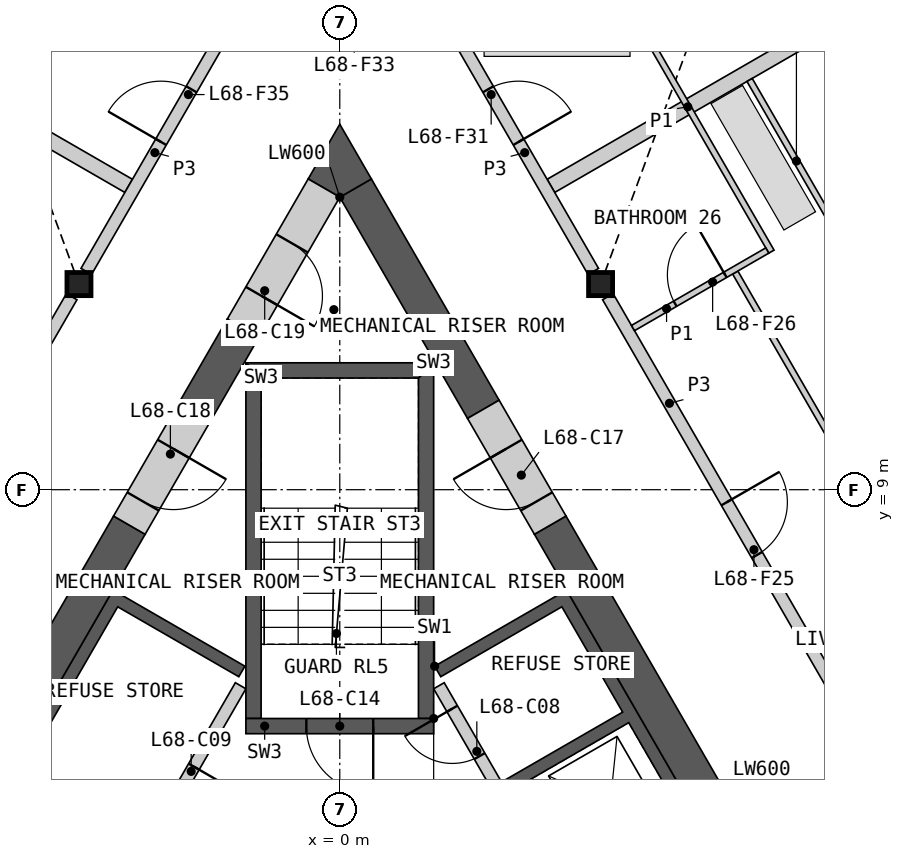
"""IFC4 building model, lengths in metres.
Left out: names, types, materials, properties, quantities, classifications, styles, units other than length and angle.
Written with IfcOpenShell. Run it as: python <this file> out.ifc"""

import sys

from ifc_helpers import new_model, si_unit, direction, frame, frame_2d, origin, origin_2d, place, context, subcontext, project, spatial, polyline, rectangle, i_section, outline, extrude, element, fill, save


model = new_model("IFC4")
c1 = context("Model", 3, precision=1e-05, world=origin(), true_north=direction((0.0, 1.0)))
c2 = subcontext(c1, "Body", "Model", "MODEL_VIEW")
j1 = project(units=[si_unit("LENGTHUNIT", "METRE"), si_unit("PLANEANGLEUNIT", "RADIAN")], contexts=[c1])
p1 = place(None, origin())
s1 = spatial("IfcSite", under=j1, at=p1, CompositionType="ELEMENT")
p2 = place(p1, origin())
s2 = spatial("IfcBuilding", under=s1, at=p2, CompositionType="ELEMENT")
p3 = place(p2, frame((0.0, 0.0, 312.0)))
s3 = spatial("IfcBuildingStorey", under=s2, at=p3, CompositionType="ELEMENT", Elevation=312.0)
for number, where, z_axis, x_axis in (
    (1, (-4.289, 12.382, 0.0), (0.0, 0.0, 1.0), (1.0, 0.0, 0.0)),
    (2, (4.289, 12.382, 0.0), (0.0, 0.0, 1.0), (1.0, 0.0, 0.0)),
):
    element("IfcColumn", number, at=place(p3, frame(where, z_axis=z_axis, x_axis=x_axis)), inside=s3, PredefinedType="COLUMN", context=c2, shape_type="SweptSolid", body=[
        extrude(i_section(OverallWidth=0.396, OverallDepth=0.381, WebThickness=0.019, FlangeThickness=0.03, at=origin_2d()), origin(), (0.0, 0.0, 1.0), 3.4),
    ])
p4 = place(p3, origin())
e3 = element("IfcWall", 3, at=p4, inside=s3, PredefinedType="SHEAR", context=c2, shape_type="SweptSolid", body=[
    extrude(outline(polyline([(1.561, 6.097), (3.731, 7.35), (8.231, -0.444), (6.061, -1.697), (5.96, -1.524), (7.952, -0.374), (6.952, 1.358), (4.96, 0.208), (4.861, 0.381), (6.852, 1.531), (5.852, 3.263), (3.861, 2.113), (3.76, 2.287), (5.752, 3.437), (4.752, 5.169), (2.76, 4.019), (2.66, 4.192), (4.652, 5.342), (3.652, 7.074), (1.66, 5.924), (1.561, 6.097)])), origin(), (0.0, 0.0, 1.0), 3.1),
])
p5 = place(p3, frame((5.817, -1.476, 0.0), z_axis=(0.0, 0.0, 1.0), x_axis=(-0.500002616675, 0.866023893041, 0.0)))
e4 = element("IfcWall", 4, at=p5, inside=s3, PredefinedType="SOLIDWALL", context=c2, shape_type="SweptSolid", body=[
    extrude(rectangle(XDim=8.373, YDim=0.2, at=frame_2d((4.187, 0.0))), origin(), (0.0, 0.0, 1.0), 3.1),
])
p6 = place(p5, frame((0.337, 0.0, 0.0)))
e5 = element("IfcOpeningElement", 5, at=p6, cuts=e4, PredefinedType="OPENING", context=c2, shape_type="SweptSolid", body=[
    extrude(rectangle(XDim=1.1, YDim=2.1, at=frame_2d((0.55, 1.05))), frame((0.0, 0.11, 0.0), z_axis=(0.0, -1.0, 0.0), x_axis=(1.0, 0.0, 0.0)), (0.0, 0.0, 1.0), 0.22),
])
p7 = place(p5, frame((2.537, 0.0, 0.0)))
e6 = element("IfcOpeningElement", 6, at=p7, cuts=e4, PredefinedType="OPENING", context=c2, shape_type="SweptSolid", body=[
    extrude(rectangle(XDim=1.1, YDim=2.1, at=frame_2d((0.55, 1.05))), frame((0.0, 0.11, 0.0), z_axis=(0.0, -1.0, 0.0), x_axis=(1.0, 0.0, 0.0)), (0.0, 0.0, 1.0), 0.22),
])
p8 = place(p5, frame((4.737, 0.0, 0.0)))
e7 = element("IfcOpeningElement", 7, at=p8, cuts=e4, PredefinedType="OPENING", context=c2, shape_type="SweptSolid", body=[
    extrude(rectangle(XDim=1.1, YDim=2.1, at=frame_2d((0.55, 1.05))), frame((0.0, 0.11, 0.0), z_axis=(0.0, -1.0, 0.0), x_axis=(1.0, 0.0, 0.0)), (0.0, 0.0, 1.0), 0.22),
])
p9 = place(p5, frame((7.037, 0.0, 0.0)))
e8 = element("IfcOpeningElement", 8, at=p9, cuts=e4, PredefinedType="OPENING", context=c2, shape_type="SweptSolid", body=[
    extrude(rectangle(XDim=0.9, YDim=2.1, at=frame_2d((0.45, 1.05))), frame((0.0, 0.11, 0.0), z_axis=(0.0, -1.0, 0.0), x_axis=(1.0, 0.0, 0.0)), (0.0, 0.0, 1.0), 0.22),
])
p10 = place(p3, origin())
e9 = element("IfcWall", 9, at=p10, inside=s3, PredefinedType="SHEAR", context=c2, shape_type="SweptSolid", body=[
    extrude(outline(polyline([(-4.96, 0.208), (-7.131, 1.461), (-3.731, 7.35), (-1.561, 6.097), (-1.66, 5.924), (-3.652, 7.074), (-5.752, 3.437), (-3.76, 2.287), (-3.861, 2.113), (-5.852, 3.263), (-6.852, 1.531), (-4.861, 0.381), (-4.96, 0.208)])), origin(), (0.0, 0.0, 1.0), 3.1),
])
p11 = place(p3, frame((-1.631, 5.776, 0.0), z_axis=(0.0, 0.0, 1.0), x_axis=(-0.499992876559, -0.866029516466, 0.0)))
e10 = element("IfcWall", 10, at=p11, inside=s3, PredefinedType="SOLIDWALL", context=c2, shape_type="SweptSolid", body=[
    extrude(rectangle(XDim=6.486, YDim=0.2, at=frame_2d((3.243, 0.0))), origin(), (0.0, 0.0, 1.0), 3.1),
])
p12 = place(p11, frame((1.537, 0.0, 0.0)))
e11 = element("IfcOpeningElement", 11, at=p12, cuts=e10, PredefinedType="OPENING", context=c2, shape_type="SweptSolid", body=[
    extrude(rectangle(XDim=0.9, YDim=2.1, at=frame_2d((0.45, 1.05))), frame((0.0, 0.11, 0.0), z_axis=(0.0, -1.0, 0.0), x_axis=(1.0, 0.0, 0.0)), (0.0, 0.0, 1.0), 0.22),
])
p13 = place(p11, frame((4.837, 0.0, 0.0)))
e12 = element("IfcOpeningElement", 12, at=p13, cuts=e10, PredefinedType="OPENING", context=c2, shape_type="SweptSolid", body=[
    extrude(rectangle(XDim=0.9, YDim=2.1, at=frame_2d((0.45, 1.05))), frame((0.0, 0.11, 0.0), z_axis=(0.0, -1.0, 0.0), x_axis=(1.0, 0.0, 0.0)), (0.0, 0.0, 1.0), 0.22),
])
p14 = place(p3, origin())
e13 = element("IfcWall", 13, at=p14, inside=s3, PredefinedType="SHEAR", context=c2, shape_type="SweptSolid", body=[
    extrude(outline(polyline([(1.544, 5.237), (1.544, 11.087), (1.294, 10.837), (1.294, 5.237), (1.544, 5.237)])), origin(), (0.0, 0.0, 1.0), 3.1),
])
p15 = place(p3, origin())
e14 = element("IfcWall", 14, at=p15, inside=s3, PredefinedType="SHEAR", context=c2, shape_type="SweptSolid", body=[
    extrude(outline(polyline([(1.544, 11.087), (-1.544, 11.087), (-1.294, 10.837), (1.294, 10.837), (1.544, 11.087)])), origin(), (0.0, 0.0, 1.0), 3.1),
])
p16 = place(p3, origin())
e15 = element("IfcWall", 15, at=p16, inside=s3, PredefinedType="SHEAR", context=c2, shape_type="SweptSolid", body=[
    extrude(outline(polyline([(-1.294, 10.837), (-1.544, 11.087), (-1.544, 5.237), (-1.294, 5.237), (-1.294, 10.837)])), origin(), (0.0, 0.0, 1.0), 3.1),
])
p17 = place(p3, frame((1.544, 5.112, 0.0), z_axis=(0.0, 0.0, 1.0), x_axis=(-1.0, 0.0, 0.0)))
e16 = element("IfcWall", 16, at=p17, inside=s3, PredefinedType="SHEAR", context=c2, shape_type="SweptSolid", body=[
    extrude(rectangle(XDim=3.088, YDim=0.25, at=frame_2d((1.544, 0.0))), origin(), (0.0, 0.0, 1.0), 3.1),
])
p18 = place(p17, frame((0.994, 0.0, 0.0)))
e17 = element("IfcOpeningElement", 17, at=p18, cuts=e16, PredefinedType="OPENING", context=c2, shape_type="SweptSolid", body=[
    extrude(rectangle(XDim=1.1, YDim=2.1, at=frame_2d((0.55, 1.05))), frame((0.0, 0.135, 0.0), z_axis=(0.0, -1.0, 0.0), x_axis=(1.0, 0.0, 0.0)), (0.0, 0.0, 1.0), 0.27),
])
p19 = place(p3, frame((8.686, -0.634, 0.0), z_axis=(0.0, 0.0, 1.0), x_axis=(-0.50001836461, 0.866014800712, 0.0)))
e18 = element("IfcWall", 18, at=p19, inside=s3, PredefinedType="SHEAR", context=c2, shape_type="SweptSolid", body=[
    extrude(rectangle(XDim=10.451, YDim=0.6, at=frame_2d((5.225, 0.0))), origin(), (0.0, 0.0, 1.0), 3.1),
])
p20 = place(p3, frame((2.361, 10.322, 0.0), z_axis=(0.0, 0.0, 1.0), x_axis=(-0.500000735859, 0.866024978935, 0.0)))
e19 = element("IfcWall", 19, at=p20, inside=s3, PredefinedType="SHEAR", context=c2, shape_type="SweptSolid", body=[
    extrude(rectangle(XDim=4.202, YDim=0.6, at=frame_2d((2.101, 0.0))), origin(), (0.0, 0.0, 1.0), 3.1),
])
p21 = place(p3, frame((-3.461, 8.417, 0.0), z_axis=(0.0, 0.0, 1.0), x_axis=(-0.50000391502, -0.866023143435, 0.0)))
e20 = element("IfcWall", 20, at=p21, inside=s3, PredefinedType="SHEAR", context=c2, shape_type="SweptSolid", body=[
    extrude(rectangle(XDim=7.759, YDim=0.6, at=frame_2d((3.879, 0.0))), origin(), (0.0, 0.0, 1.0), 3.1),
])
p22 = place(p3, frame((-1.59, 11.658, 0.0), z_axis=(0.0, 0.0, 1.0), x_axis=(-0.500037594623, -0.866003697431, 0.0)))
e21 = element("IfcWall", 21, at=p22, inside=s3, PredefinedType="SHEAR", context=c2, shape_type="SweptSolid", body=[
    extrude(rectangle(XDim=1.542, YDim=0.6, at=frame_2d((0.771, 0.0))), origin(), (0.0, 0.0, 1.0), 3.1),
])
p23 = place(p3, origin())
e22 = element("IfcWall", 22, at=p23, inside=s3, PredefinedType="SHEAR", context=c2, shape_type="SweptSolid", body=[
    extrude(outline(polyline([(0.0, 13.811), (-0.52, 14.111), (0.0, 15.011), (0.52, 14.111), (0.0, 13.811)])), origin(), (0.0, 0.0, 1.0), 3.1),
])
p24 = place(p3, frame((3.461, 8.417, 0.0), z_axis=(0.0, 0.0, 1.0), x_axis=(-0.499946605688, 0.86605622881, 0.0)))
e23 = element("IfcWall", 23, at=p24, inside=s3, PredefinedType="SHEAR", context=c2, shape_type="SweptSolid", body=[
    extrude(rectangle(XDim=2.2, YDim=0.6, at=frame_2d((1.1, 0.0))), origin(), (0.0, 0.0, 1.0), 3.1),
])
p25 = place(p24, frame((0.45, 0.0, 0.0)))
e24 = element("IfcOpeningElement", 24, at=p25, cuts=e23, PredefinedType="OPENING", context=c2, shape_type="SweptSolid", body=[
    extrude(rectangle(XDim=1.0, YDim=2.1, at=frame_2d((0.5, 1.05))), frame((0.0, 0.31, 0.0), z_axis=(0.0, -1.0, 0.0), x_axis=(1.0, 0.0, 0.0)), (0.0, 0.0, 1.0), 0.62),
])
p26 = place(p3, frame((-2.361, 10.322, 0.0), z_axis=(0.0, 0.0, 1.0), x_axis=(-0.499946605688, -0.86605622881, 0.0)))
e25 = element("IfcWall", 25, at=p26, inside=s3, PredefinedType="SHEAR", context=c2, shape_type="SweptSolid", body=[
    extrude(rectangle(XDim=2.2, YDim=0.6, at=frame_2d((1.1, 0.0))), origin(), (0.0, 0.0, 1.0), 3.1),
])
p27 = place(p26, frame((0.75, 0.0, 0.0)))
e26 = element("IfcOpeningElement", 26, at=p27, cuts=e25, PredefinedType="OPENING", context=c2, shape_type="SweptSolid", body=[
    extrude(rectangle(XDim=1.0, YDim=2.1, at=frame_2d((0.5, 1.05))), frame((0.0, 0.31, 0.0), z_axis=(0.0, -1.0, 0.0), x_axis=(1.0, 0.0, 0.0)), (0.0, 0.0, 1.0), 0.62),
])
p28 = place(p3, frame((-0.26, 13.961, 0.0), z_axis=(0.0, 0.0, 1.0), x_axis=(-0.49997936161, -0.866037319036, 0.0)))
e27 = element("IfcWall", 27, at=p28, inside=s3, PredefinedType="SHEAR", context=c2, shape_type="SweptSolid", body=[
    extrude(rectangle(XDim=2.66, YDim=0.6, at=frame_2d((1.33, 0.0))), origin(), (0.0, 0.0, 1.0), 3.1),
])
p29 = place(p28, frame((1.05, 0.0, 0.0)))
e28 = element("IfcOpeningElement", 28, at=p29, cuts=e27, PredefinedType="OPENING", context=c2, shape_type="SweptSolid", body=[
    extrude(rectangle(XDim=1.0, YDim=2.1, at=frame_2d((0.5, 1.05))), frame((0.0, 0.31, 0.0), z_axis=(0.0, -1.0, 0.0), x_axis=(1.0, 0.0, 0.0)), (0.0, 0.0, 1.0), 0.62),
])
p30 = place(p3, frame((3.472, 13.997, 0.0), z_axis=(0.0, 0.0, 1.0), x_axis=(0.866029233976, 0.499993365855, 0.0)))
e29 = element("IfcWall", 29, at=p30, inside=s3, PredefinedType="PARTITIONING", context=c2, shape_type="SweptSolid", body=[
    extrude(rectangle(XDim=12.637, YDim=0.25, at=frame_2d((6.319, 0.0))), origin(), (0.0, 0.0, 1.0), 2.33),
])
p31 = place(p3, frame((-8.458, 5.16, 0.0), z_axis=(0.0, 0.0, 1.0), x_axis=(0.499984266882, 0.866034487114, 0.0)))
e30 = element("IfcWall", 30, at=p31, inside=s3, PredefinedType="PARTITIONING", context=c2, shape_type="SweptSolid", body=[
    extrude(rectangle(XDim=8.099, YDim=0.2, at=frame_2d((4.049, 0.0))), origin(), (0.0, 0.0, 1.0), 3.1),
])
p32 = place(p31, frame((3.093, 0.0, 0.0)))
e31 = element("IfcOpeningElement", 31, at=p32, cuts=e30, PredefinedType="OPENING", context=c2, shape_type="SweptSolid", body=[
    extrude(rectangle(XDim=1.0, YDim=2.1, at=frame_2d((0.5, 1.05))), frame((0.0, 0.11, 0.0), z_axis=(0.0, -1.0, 0.0), x_axis=(1.0, 0.0, 0.0)), (0.0, 0.0, 1.0), 0.22),
])
p33 = place(p3, frame((4.409, 12.174, 0.0), z_axis=(0.0, 0.0, 1.0), x_axis=(0.499984266882, -0.866034487114, 0.0)))
e32 = element("IfcWall", 32, at=p33, inside=s3, PredefinedType="PARTITIONING", context=c2, shape_type="SweptSolid", body=[
    extrude(rectangle(XDim=8.099, YDim=0.2, at=frame_2d((4.049, 0.0))), origin(), (0.0, 0.0, 1.0), 3.1),
])
p34 = place(p33, frame((3.905, 0.0, 0.0)))
e33 = element("IfcOpeningElement", 33, at=p34, cuts=e32, PredefinedType="OPENING", context=c2, shape_type="SweptSolid", body=[
    extrude(rectangle(XDim=1.0, YDim=2.1, at=frame_2d((0.5, 1.05))), frame((0.0, 0.11, 0.0), z_axis=(0.0, -1.0, 0.0), x_axis=(1.0, 0.0, 0.0)), (0.0, 0.0, 1.0), 0.22),
])
p35 = place(p3, frame((-8.257, 16.76, 0.0), z_axis=(0.0, 0.0, 1.0), x_axis=(0.866034739526, -0.499983829672, 0.0)))
e34 = element("IfcWall", 34, at=p35, inside=s3, PredefinedType="PARTITIONING", context=c2, shape_type="SweptSolid", body=[
    extrude(rectangle(XDim=5.525, YDim=0.25, at=frame_2d((2.763, 0.0))), origin(), (0.0, 0.0, 1.0), 2.33),
])
p36 = place(p3, frame((1.913, 16.498, 0.0), z_axis=(0.0, 0.0, 1.0), x_axis=(0.499950370306, -0.866054055606, 0.0)))
e35 = element("IfcWall", 35, at=p36, inside=s3, PredefinedType="PARTITIONING", context=c2, shape_type="SweptSolid", body=[
    extrude(rectangle(XDim=4.513, YDim=0.2, at=frame_2d((2.256, 0.0))), origin(), (0.0, 0.0, 1.0), 3.1),
])
p37 = place(p36, frame((1.053, 0.0, 0.0)))
e36 = element("IfcOpeningElement", 36, at=p37, cuts=e35, PredefinedType="OPENING", context=c2, shape_type="SweptSolid", body=[
    extrude(rectangle(XDim=1.0, YDim=2.1, at=frame_2d((0.5, 1.05))), frame((0.0, 0.11, 0.0), z_axis=(0.0, -1.0, 0.0), x_axis=(1.0, 0.0, 0.0)), (0.0, 0.0, 1.0), 0.22),
])
p38 = place(p3, frame((-4.169, 12.59, 0.0), z_axis=(0.0, 0.0, 1.0), x_axis=(0.499950370306, 0.866054055606, 0.0)))
e37 = element("IfcWall", 37, at=p38, inside=s3, PredefinedType="PARTITIONING", context=c2, shape_type="SweptSolid", body=[
    extrude(rectangle(XDim=4.513, YDim=0.2, at=frame_2d((2.256, 0.0))), origin(), (0.0, 0.0, 1.0), 3.1),
])
p39 = place(p38, frame((2.459, 0.0, 0.0)))
e38 = element("IfcOpeningElement", 38, at=p39, cuts=e37, PredefinedType="OPENING", context=c2, shape_type="SweptSolid", body=[
    extrude(rectangle(XDim=1.0, YDim=2.1, at=frame_2d((0.5, 1.05))), frame((0.0, 0.11, 0.0), z_axis=(0.0, -1.0, 0.0), x_axis=(1.0, 0.0, 0.0)), (0.0, 0.0, 1.0), 0.22),
])
p40 = place(p3, frame((6.74, 15.739, 0.0), z_axis=(0.0, 0.0, 1.0), x_axis=(0.499995022685, -0.86602827742, 0.0)))
e39 = element("IfcWall", 39, at=p40, inside=s3, PredefinedType="PARTITIONING", context=c2, shape_type="SweptSolid", body=[
    extrude(rectangle(XDim=15.404, YDim=0.1, at=frame_2d((7.702, 0.0))), origin(), (0.0, 0.0, 1.0), 2.33),
])
p41 = place(p40, frame((8.582, 0.0, 0.0)))
e40 = element("IfcOpeningElement", 40, at=p41, cuts=e39, PredefinedType="OPENING", context=c2, shape_type="SweptSolid", body=[
    extrude(rectangle(XDim=0.95, YDim=2.1, at=frame_2d((0.475, 1.05))), frame((0.0, 0.06, 0.0), z_axis=(0.0, -1.0, 0.0), x_axis=(1.0, 0.0, 0.0)), (0.0, 0.0, 1.0), 0.12),
])
p42 = place(p3, frame((6.504, 12.572, 0.0), z_axis=(0.0, 0.0, 1.0), x_axis=(0.499998094172, -0.866026504112, 0.0)))
e41 = element("IfcWall", 41, at=p42, inside=s3, PredefinedType="PARTITIONING", context=c2, shape_type="SweptSolid", body=[
    extrude(rectangle(XDim=12.778, YDim=0.1, at=frame_2d((6.389, 0.0))), origin(), (0.0, 0.0, 1.0), 2.33),
])
p43 = place(p42, frame((3.759, 0.0, 0.0)))
e42 = element("IfcOpeningElement", 42, at=p43, cuts=e41, PredefinedType="OPENING", context=c2, shape_type="SweptSolid", body=[
    extrude(rectangle(XDim=0.95, YDim=2.1, at=frame_2d((0.475, 1.05))), frame((0.0, 0.06, 0.0), z_axis=(0.0, -1.0, 0.0), x_axis=(1.0, 0.0, 0.0)), (0.0, 0.0, 1.0), 0.12),
])
p44 = place(p3, frame((4.349, 17.679, 0.0), z_axis=(0.0, 0.0, 1.0), x_axis=(0.49997732567, -0.866038494419, 0.0)))
e43 = element("IfcWall", 43, at=p44, inside=s3, PredefinedType="PARTITIONING", context=c2, shape_type="SweptSolid", body=[
    extrude(rectangle(XDim=5.5, YDim=0.1, at=frame_2d((2.75, 0.0))), origin(), (0.0, 0.0, 1.0), 2.33),
])
p45 = place(p3, frame((-7.099, 12.915, 0.0), z_axis=(0.0, 0.0, 1.0), x_axis=(0.49997732567, 0.866038494419, 0.0)))
e44 = element("IfcWall", 44, at=p45, inside=s3, PredefinedType="PARTITIONING", context=c2, shape_type="SweptSolid", body=[
    extrude(rectangle(XDim=5.5, YDim=0.1, at=frame_2d((2.75, 0.0))), origin(), (0.0, 0.0, 1.0), 2.33),
])
p46 = place(p45, frame((0.756, 0.0, 0.0)))
e45 = element("IfcOpeningElement", 45, at=p46, cuts=e44, PredefinedType="OPENING", context=c2, shape_type="SweptSolid", body=[
    extrude(rectangle(XDim=0.95, YDim=2.1, at=frame_2d((0.475, 1.05))), frame((0.0, 0.06, 0.0), z_axis=(0.0, -1.0, 0.0), x_axis=(1.0, 0.0, 0.0)), (0.0, 0.0, 1.0), 0.12),
])
p47 = place(p3, frame((4.822, 11.659, 0.0), z_axis=(0.0, 0.0, 1.0), x_axis=(0.866030925526, 0.499990435942, 0.0)))
e46 = element("IfcWall", 46, at=p47, inside=s3, PredefinedType="PARTITIONING", context=c2, shape_type="SweptSolid", body=[
    extrude(rectangle(XDim=2.55, YDim=0.1, at=frame_2d((1.275, 0.0))), origin(), (0.0, 0.0, 1.0), 2.33),
])
p48 = place(p47, frame((0.8, 0.0, 0.0)))
e47 = element("IfcOpeningElement", 47, at=p48, cuts=e46, PredefinedType="OPENING", context=c2, shape_type="SweptSolid", body=[
    extrude(rectangle(XDim=0.95, YDim=2.1, at=frame_2d((0.475, 1.05))), frame((0.0, 0.06, 0.0), z_axis=(0.0, -1.0, 0.0), x_axis=(1.0, 0.0, 0.0)), (0.0, 0.0, 1.0), 0.12),
])
p49 = place(p9, origin())
e48 = element("IfcDoor", 48, at=p49, inside=s3, OperationType="SINGLE_SWING_RIGHT", PredefinedType="DOOR", context=c2, shape_type="SweptSolid", body=[
    extrude(rectangle(XDim=0.9, YDim=2.1, at=frame_2d((0.45, 1.05))), frame((0.0, 0.025, 0.0), z_axis=(0.0, -1.0, 0.0), x_axis=(1.0, 0.0, 0.0)), (0.0, 0.0, 1.0), 0.05),
])
fill(e8, e48)
p50 = place(p12, origin())
e49 = element("IfcDoor", 49, at=p50, inside=s3, OperationType="SINGLE_SWING_LEFT", PredefinedType="DOOR", context=c2, shape_type="SweptSolid", body=[
    extrude(rectangle(XDim=0.9, YDim=2.1, at=frame_2d((0.45, 1.05))), frame((0.0, 0.025, 0.0), z_axis=(0.0, -1.0, 0.0), x_axis=(1.0, 0.0, 0.0)), (0.0, 0.0, 1.0), 0.05),
])
fill(e11, e49)
p51 = place(p18, origin())
e50 = element("IfcDoor", 50, at=p51, inside=s3, OperationType="SINGLE_SWING_LEFT", PredefinedType="DOOR", context=c2, shape_type="SweptSolid", body=[
    extrude(rectangle(XDim=1.1, YDim=2.1, at=frame_2d((0.55, 1.05))), frame((0.0, 0.025, 0.0), z_axis=(0.0, -1.0, 0.0), x_axis=(1.0, 0.0, 0.0)), (0.0, 0.0, 1.0), 0.05),
])
fill(e17, e50)
p52 = place(p25, origin())
e51 = element("IfcDoor", 51, at=p52, inside=s3, OperationType="SINGLE_SWING_RIGHT", PredefinedType="DOOR", context=c2, shape_type="SweptSolid", body=[
    extrude(rectangle(XDim=1.0, YDim=2.1, at=frame_2d((0.5, 1.05))), frame((0.0, 0.055, 0.0), z_axis=(0.0, -1.0, 0.0), x_axis=(1.0, 0.0, 0.0)), (0.0, 0.0, 1.0), 0.05),
])
fill(e24, e51)
p53 = place(p27, origin())
e52 = element("IfcDoor", 52, at=p53, inside=s3, OperationType="SINGLE_SWING_LEFT", PredefinedType="DOOR", context=c2, shape_type="SweptSolid", body=[
    extrude(rectangle(XDim=1.0, YDim=2.1, at=frame_2d((0.5, 1.05))), frame((0.0, 0.055, 0.0), z_axis=(0.0, -1.0, 0.0), x_axis=(1.0, 0.0, 0.0)), (0.0, 0.0, 1.0), 0.05),
])
fill(e26, e52)
p54 = place(p29, origin())
e53 = element("IfcDoor", 53, at=p54, inside=s3, OperationType="SINGLE_SWING_RIGHT", PredefinedType="DOOR", context=c2, shape_type="SweptSolid", body=[
    extrude(rectangle(XDim=1.0, YDim=2.1, at=frame_2d((0.5, 1.05))), frame((0.0, 0.055, 0.0), z_axis=(0.0, -1.0, 0.0), x_axis=(1.0, 0.0, 0.0)), (0.0, 0.0, 1.0), 0.05),
])
fill(e28, e53)
p55 = place(p34, origin())
e54 = element("IfcDoor", 54, at=p55, inside=s3, OperationType="SINGLE_SWING_LEFT", PredefinedType="DOOR", context=c2, shape_type="SweptSolid", body=[
    extrude(rectangle(XDim=1.0, YDim=2.1, at=frame_2d((0.5, 1.05))), frame((0.0, 0.025, 0.0), z_axis=(0.0, -1.0, 0.0), x_axis=(1.0, 0.0, 0.0)), (0.0, 0.0, 1.0), 0.05),
])
fill(e33, e54)
p56 = place(p48, origin())
e55 = element("IfcDoor", 55, at=p56, inside=s3, OperationType="SINGLE_SWING_RIGHT", PredefinedType="DOOR", context=c2, shape_type="SweptSolid", body=[
    extrude(rectangle(XDim=0.95, YDim=2.1, at=frame_2d((0.475, 1.05))), frame((0.0, 0.025, 0.0), z_axis=(0.0, -1.0, 0.0), x_axis=(1.0, 0.0, 0.0)), (0.0, 0.0, 1.0), 0.05),
])
fill(e47, e55)
p57 = place(p37, origin())
e56 = element("IfcDoor", 56, at=p57, inside=s3, OperationType="SINGLE_SWING_RIGHT", PredefinedType="DOOR", context=c2, shape_type="SweptSolid", body=[
    extrude(rectangle(XDim=1.0, YDim=2.1, at=frame_2d((0.5, 1.05))), frame((0.0, 0.025, 0.0), z_axis=(0.0, -1.0, 0.0), x_axis=(1.0, 0.0, 0.0)), (0.0, 0.0, 1.0), 0.05),
])
fill(e36, e56)
p58 = place(p39, origin())
e57 = element("IfcDoor", 57, at=p58, inside=s3, OperationType="SINGLE_SWING_LEFT", PredefinedType="DOOR", context=c2, shape_type="SweptSolid", body=[
    extrude(rectangle(XDim=1.0, YDim=2.1, at=frame_2d((0.5, 1.05))), frame((0.0, 0.025, 0.0), z_axis=(0.0, -1.0, 0.0), x_axis=(1.0, 0.0, 0.0)), (0.0, 0.0, 1.0), 0.05),
])
fill(e38, e57)
save(model, sys.argv[1])
